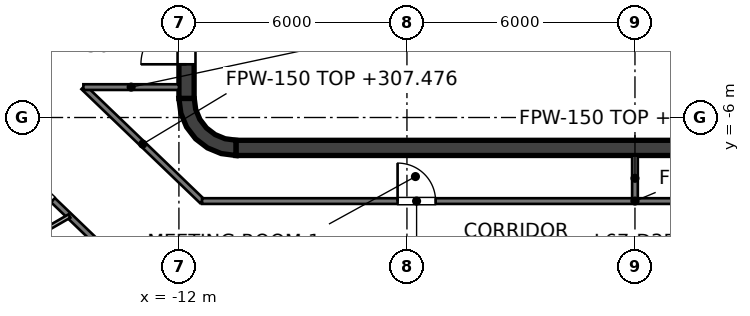
"""IFC4 building model, lengths in metres.
Left out: names, types, materials, properties, quantities, classifications, styles, units other than length and angle.
Written with IfcOpenShell. Run it as: python <this file> out.ifc"""

import sys

from ifc_helpers import new_model, si_unit, direction, frame, frame_2d, origin, place, context, subcontext, project, spatial, polyline, rectangle, outline, extrude, element, fill, save


model = new_model("IFC4")
c1 = context("Model", 3, precision=1e-05, world=origin(), true_north=direction((0.0, 1.0)))
c2 = subcontext(c1, "Body", "Model", "MODEL_VIEW")
j1 = project(units=[si_unit("LENGTHUNIT", "METRE"), si_unit("PLANEANGLEUNIT", "RADIAN")], contexts=[c1])
p1 = place(None, origin())
s1 = spatial("IfcSite", under=j1, at=p1, CompositionType="ELEMENT")
p2 = place(p1, origin())
s2 = spatial("IfcBuilding", under=s1, at=p2, CompositionType="ELEMENT")
p3 = place(p2, frame((0.0, 0.0, 304.4)))
s3 = spatial("IfcBuildingStorey", under=s2, at=p3, CompositionType="ELEMENT", Elevation=304.4)
p4 = place(p3, frame((-10.5, -6.8, 0.0), z_axis=(0.0, 0.0, 1.0), x_axis=(1.0, 0.0, 0.0)))
e1 = element("IfcWall", 1, at=p4, inside=s3, PredefinedType="SHEAR", context=c2, shape_type="SweptSolid", body=[
    extrude(rectangle(XDim=21.0, YDim=0.4, at=frame_2d((10.5, 0.0))), origin(), (0.0, 0.0, 1.0), 4.0),
])
p5 = place(p3, frame((-11.8, -5.5, 0.0), z_axis=(0.0, 0.0, 1.0), x_axis=(0.0, 1.0, 0.0)))
e2 = element("IfcWall", 2, at=p5, inside=s3, PredefinedType="SHEAR", context=c2, shape_type="SweptSolid", body=[
    extrude(rectangle(XDim=11.0, YDim=0.4, at=frame_2d((5.5, 0.0))), origin(), (0.0, 0.0, 1.0), 4.0),
])
p6 = place(p5, frame((3.8, 0.0, 0.0)))
e3 = element("IfcOpeningElement", 3, at=p6, cuts=e2, PredefinedType="OPENING", context=c2, shape_type="SweptSolid", body=[
    extrude(rectangle(XDim=1.0, YDim=2.1, at=frame_2d((0.5, 1.05))), frame((0.0, 0.2, 0.0), z_axis=(0.0, -1.0, 0.0), x_axis=(1.0, 0.0, 0.0)), (0.0, 0.0, 1.0), 0.4),
])
p7 = place(p5, frame((6.7, 0.0, 0.0)))
e4 = element("IfcOpeningElement", 4, at=p7, cuts=e2, PredefinedType="OPENING", context=c2, shape_type="SweptSolid", body=[
    extrude(rectangle(XDim=1.0, YDim=2.1, at=frame_2d((0.5, 1.05))), frame((0.0, 0.2, 0.0), z_axis=(0.0, -1.0, 0.0), x_axis=(1.0, 0.0, 0.0)), (0.0, 0.0, 1.0), 0.4),
])
p8 = place(p5, frame((0.9, 0.0, 0.0)))
e5 = element("IfcOpeningElement", 5, at=p8, cuts=e2, PredefinedType="OPENING", context=c2, shape_type="SweptSolid", body=[
    extrude(rectangle(XDim=1.2, YDim=2.1, at=frame_2d((0.6, 1.05))), frame((0.0, 0.2, 0.0), z_axis=(0.0, -1.0, 0.0), x_axis=(1.0, 0.0, 0.0)), (0.0, 0.0, 1.0), 0.4),
])
p9 = place(p5, frame((8.9, 0.0, 0.0)))
e6 = element("IfcOpeningElement", 6, at=p9, cuts=e2, PredefinedType="OPENING", context=c2, shape_type="SweptSolid", body=[
    extrude(rectangle(XDim=1.2, YDim=2.1, at=frame_2d((0.6, 1.05))), frame((0.0, 0.2, 0.0), z_axis=(0.0, -1.0, 0.0), x_axis=(1.0, 0.0, 0.0)), (0.0, 0.0, 1.0), 0.4),
])
p10 = place(p3, origin())
e7 = element("IfcWall", 7, at=p10, inside=s3, PredefinedType="SHEAR", context=c2, shape_type="SweptSolid", body=[
    extrude(outline(polyline([(-10.5, -7.0), (-10.5, -6.596), (-10.784, -6.559), (-11.048, -6.45), (-11.275, -6.275), (-11.45, -6.048), (-11.559, -5.784), (-11.596, -5.5), (-12.0, -5.5), (-11.949, -5.888), (-11.799, -6.25), (-11.561, -6.561), (-11.25, -6.799), (-10.888, -6.949), (-10.5, -7.0)])), origin(), (0.0, 0.0, 1.0), 4.0),
])
p11 = place(p3, frame((-1.2, -6.6, 0.0), z_axis=(0.0, 0.0, 1.0), x_axis=(0.0, 1.0, 0.0)))
e8 = element("IfcWall", 8, at=p11, inside=s3, PredefinedType="PARTITIONING", context=c2, shape_type="SweptSolid", body=[
    extrude(rectangle(XDim=2.5, YDim=0.15, at=frame_2d((1.25, 0.0))), origin(), (0.0, 0.0, 1.0), 3.85),
])
p12 = place(p11, frame((0.8, 0.0, 0.0)))
e9 = element("IfcOpeningElement", 9, at=p12, cuts=e8, PredefinedType="OPENING", context=c2, shape_type="SweptSolid", body=[
    extrude(rectangle(XDim=0.9, YDim=2.1, at=frame_2d((0.45, 1.05))), frame((0.0, 0.075, 0.0), z_axis=(0.0, -1.0, 0.0), x_axis=(1.0, 0.0, 0.0)), (0.0, 0.0, 1.0), 0.15),
])
p13 = place(p3, frame((-9.0, -6.6, 0.0), z_axis=(0.0, 0.0, 1.0), x_axis=(0.0, 1.0, 0.0)))
e10 = element("IfcWall", 10, at=p13, inside=s3, PredefinedType="PARTITIONING", context=c2, shape_type="SweptSolid", body=[
    extrude(rectangle(XDim=2.5, YDim=0.25, at=frame_2d((1.25, 0.0))), origin(), (0.0, 0.0, 1.0), 3.85),
])
p14 = place(p13, frame((0.75, 0.0, 0.0)))
e11 = element("IfcOpeningElement", 11, at=p14, cuts=e10, PredefinedType="OPENING", context=c2, shape_type="SweptSolid", body=[
    extrude(rectangle(XDim=1.0, YDim=2.1, at=frame_2d((0.5, 1.05))), frame((0.0, 0.125, 0.0), z_axis=(0.0, -1.0, 0.0), x_axis=(1.0, 0.0, 0.0)), (0.0, 0.0, 1.0), 0.25),
])
p15 = place(p3, frame((-2.9, -6.6, 0.0), z_axis=(0.0, 0.0, 1.0), x_axis=(0.0, 1.0, 0.0)))
e12 = element("IfcWall", 12, at=p15, inside=s3, PredefinedType="PARTITIONING", context=c2, shape_type="SweptSolid", body=[
    extrude(rectangle(XDim=2.5, YDim=0.25, at=frame_2d((1.25, 0.0))), origin(), (0.0, 0.0, 1.0), 3.85),
])
p16 = place(p15, frame((0.8, 0.0, 0.0)))
e13 = element("IfcOpeningElement", 13, at=p16, cuts=e12, PredefinedType="OPENING", context=c2, shape_type="SweptSolid", body=[
    extrude(rectangle(XDim=0.9, YDim=2.1, at=frame_2d((0.45, 1.05))), frame((0.0, 0.125, 0.0), z_axis=(0.0, -1.0, 0.0), x_axis=(1.0, 0.0, 0.0)), (0.0, 0.0, 1.0), 0.25),
])
p17 = place(p3, frame((-18.95, -4.683, 0.0), z_axis=(0.0, 0.0, 1.0), x_axis=(0.72127259513, -0.692651314526, 0.0)))
e14 = element("IfcWall", 14, at=p17, inside=s3, PredefinedType="PARTITIONING", context=c2, shape_type="SweptSolid", body=[
    extrude(rectangle(XDim=8.974, YDim=0.15, at=frame_2d((4.487, 0.0))), origin(), (0.0, 0.0, 1.0), 2.995),
])
p18 = place(p17, frame((4.039, 0.0, 0.0)))
e15 = element("IfcOpeningElement", 15, at=p18, cuts=e14, PredefinedType="OPENING", context=c2, shape_type="SweptSolid", body=[
    extrude(rectangle(XDim=1.0, YDim=2.1, at=frame_2d((0.5, 1.05))), frame((0.0, 0.075, 0.0), z_axis=(0.0, -1.0, 0.0), x_axis=(1.0, 0.0, 0.0)), (0.0, 0.0, 1.0), 0.15),
])
p19 = place(p3, frame((-14.514, -5.2, 0.0), z_axis=(0.0, 0.0, 1.0), x_axis=(0.721228427004, -0.692697304803, 0.0)))
e16 = element("IfcWall", 16, at=p19, inside=s3, PredefinedType="PARTITIONING", context=c2, shape_type="SweptSolid", body=[
    extrude(rectangle(XDim=4.33, YDim=0.15, at=frame_2d((2.165, 0.0))), origin(), (0.0, 0.0, 1.0), 3.076),
])
p20 = place(p3, frame((-11.391, -8.199, 0.0), z_axis=(0.0, 0.0, 1.0), x_axis=(1.0, 0.0, 0.0)))
e17 = element("IfcWall", 17, at=p20, inside=s3, PredefinedType="PARTITIONING", context=c2, shape_type="SweptSolid", body=[
    extrude(rectangle(XDim=22.782, YDim=0.15, at=frame_2d((11.391, 0.0))), origin(), (0.0, 0.0, 1.0), 2.927),
])
p21 = place(p20, frame((5.145, 0.0, 0.0)))
e18 = element("IfcOpeningElement", 18, at=p21, cuts=e17, PredefinedType="OPENING", context=c2, shape_type="SweptSolid", body=[
    extrude(rectangle(XDim=1.0, YDim=2.1, at=frame_2d((0.5, 1.05))), frame((0.0, 0.075, 0.0), z_axis=(0.0, -1.0, 0.0), x_axis=(1.0, 0.0, 0.0)), (0.0, 0.0, 1.0), 0.15),
])
p22 = place(p20, frame((16.536, 0.0, 0.0)))
e19 = element("IfcOpeningElement", 19, at=p22, cuts=e17, PredefinedType="OPENING", context=c2, shape_type="SweptSolid", body=[
    extrude(rectangle(XDim=1.0, YDim=2.1, at=frame_2d((0.5, 1.05))), frame((0.0, 0.075, 0.0), z_axis=(0.0, -1.0, 0.0), x_axis=(1.0, 0.0, 0.0)), (0.0, 0.0, 1.0), 0.15),
])
p23 = place(p3, frame((-14.514, -5.2, 0.0), z_axis=(0.0, 0.0, 1.0), x_axis=(1.0, 0.0, 0.0)))
e20 = element("IfcWall", 20, at=p23, inside=s3, PredefinedType="PARTITIONING", context=c2, shape_type="SweptSolid", body=[
    extrude(rectangle(XDim=2.514, YDim=0.15, at=frame_2d((1.257, 0.0))), origin(), (0.0, 0.0, 1.0), 3.152),
])
p24 = place(p3, frame((0.0, -8.199, 0.0), z_axis=(0.0, 0.0, 1.0), x_axis=(0.0, 1.0, 0.0)))
e21 = element("IfcWall", 21, at=p24, inside=s3, PredefinedType="PARTITIONING", context=c2, shape_type="SweptSolid", body=[
    extrude(rectangle(XDim=1.199, YDim=0.15, at=frame_2d((0.6, 0.0))), origin(), (0.0, 0.0, 1.0), 2.995),
])
p25 = place(p3, frame((-22.35, -6.132, 0.0), z_axis=(0.0, 0.0, 1.0), x_axis=(0.72117874289, -0.692749031615, 0.0)))
e22 = element("IfcWall", 22, at=p25, inside=s3, PredefinedType="PARTITIONING", context=c2, shape_type="SweptSolid", body=[
    extrude(rectangle(XDim=11.791, YDim=0.1, at=frame_2d((5.896, 0.0))), origin(), (0.0, 0.0, 1.0), 2.995),
])
p26 = place(p3, frame((-17.946, -10.361, 0.0), z_axis=(0.0, 0.0, 1.0), x_axis=(0.866086794771, 0.499893652614, 0.0)))
e23 = element("IfcWall", 23, at=p26, inside=s3, PredefinedType="PARTITIONING", context=c2, shape_type="SweptSolid", body=[
    extrude(rectangle(XDim=3.539, YDim=0.1, at=frame_2d((1.77, 0.0))), origin(), (0.0, 0.0, 1.0), 3.076),
])
p27 = place(p14, origin())
e24 = element("IfcDoor", 24, at=p27, inside=s3, OperationType="SINGLE_SWING_LEFT", PredefinedType="DOOR", context=c2, shape_type="SweptSolid", body=[
    extrude(rectangle(XDim=1.0, YDim=2.1, at=frame_2d((0.5, 1.05))), frame((0.0, 0.025, 0.0), z_axis=(0.0, -1.0, 0.0), x_axis=(1.0, 0.0, 0.0)), (0.0, 0.0, 1.0), 0.05),
])
fill(e11, e24)
p28 = place(p16, origin())
e25 = element("IfcDoor", 25, at=p28, inside=s3, OperationType="SINGLE_SWING_RIGHT", PredefinedType="DOOR", context=c2, shape_type="SweptSolid", body=[
    extrude(rectangle(XDim=0.9, YDim=2.1, at=frame_2d((0.45, 1.05))), frame((0.0, 0.025, 0.0), z_axis=(0.0, -1.0, 0.0), x_axis=(1.0, 0.0, 0.0)), (0.0, 0.0, 1.0), 0.05),
])
fill(e13, e25)
p29 = place(p12, origin())
e26 = element("IfcDoor", 26, at=p29, inside=s3, OperationType="SINGLE_SWING_RIGHT", PredefinedType="DOOR", context=c2, shape_type="SweptSolid", body=[
    extrude(rectangle(XDim=0.9, YDim=2.1, at=frame_2d((0.45, 1.05))), frame((0.0, 0.025, 0.0), z_axis=(0.0, -1.0, 0.0), x_axis=(1.0, 0.0, 0.0)), (0.0, 0.0, 1.0), 0.05),
])
fill(e9, e26)
p30 = place(p8, origin())
e27 = element("IfcDoor", 27, at=p30, inside=s3, OperationType="SINGLE_SWING_LEFT", PredefinedType="DOOR", context=c2, shape_type="SweptSolid", body=[
    extrude(rectangle(XDim=1.2, YDim=2.1, at=frame_2d((0.6, 1.05))), frame((0.0, 0.025, 0.0), z_axis=(0.0, -1.0, 0.0), x_axis=(1.0, 0.0, 0.0)), (0.0, 0.0, 1.0), 0.05),
])
fill(e5, e27)
p31 = place(p21, origin())
e28 = element("IfcDoor", 28, at=p31, inside=s3, OperationType="SINGLE_SWING_LEFT", PredefinedType="DOOR", context=c2, shape_type="SweptSolid", body=[
    extrude(rectangle(XDim=1.0, YDim=2.1, at=frame_2d((0.5, 1.05))), frame((0.0, 0.025, 0.0), z_axis=(0.0, -1.0, 0.0), x_axis=(1.0, 0.0, 0.0)), (0.0, 0.0, 1.0), 0.05),
])
fill(e18, e28)
p32 = place(p18, origin())
e29 = element("IfcDoor", 29, at=p32, inside=s3, OperationType="SINGLE_SWING_RIGHT", PredefinedType="DOOR", context=c2, shape_type="SweptSolid", body=[
    extrude(rectangle(XDim=1.0, YDim=2.1, at=frame_2d((0.5, 1.05))), frame((0.0, 0.025, 0.0), z_axis=(0.0, -1.0, 0.0), x_axis=(1.0, 0.0, 0.0)), (0.0, 0.0, 1.0), 0.05),
])
fill(e15, e29)
save(model, sys.argv[1])
